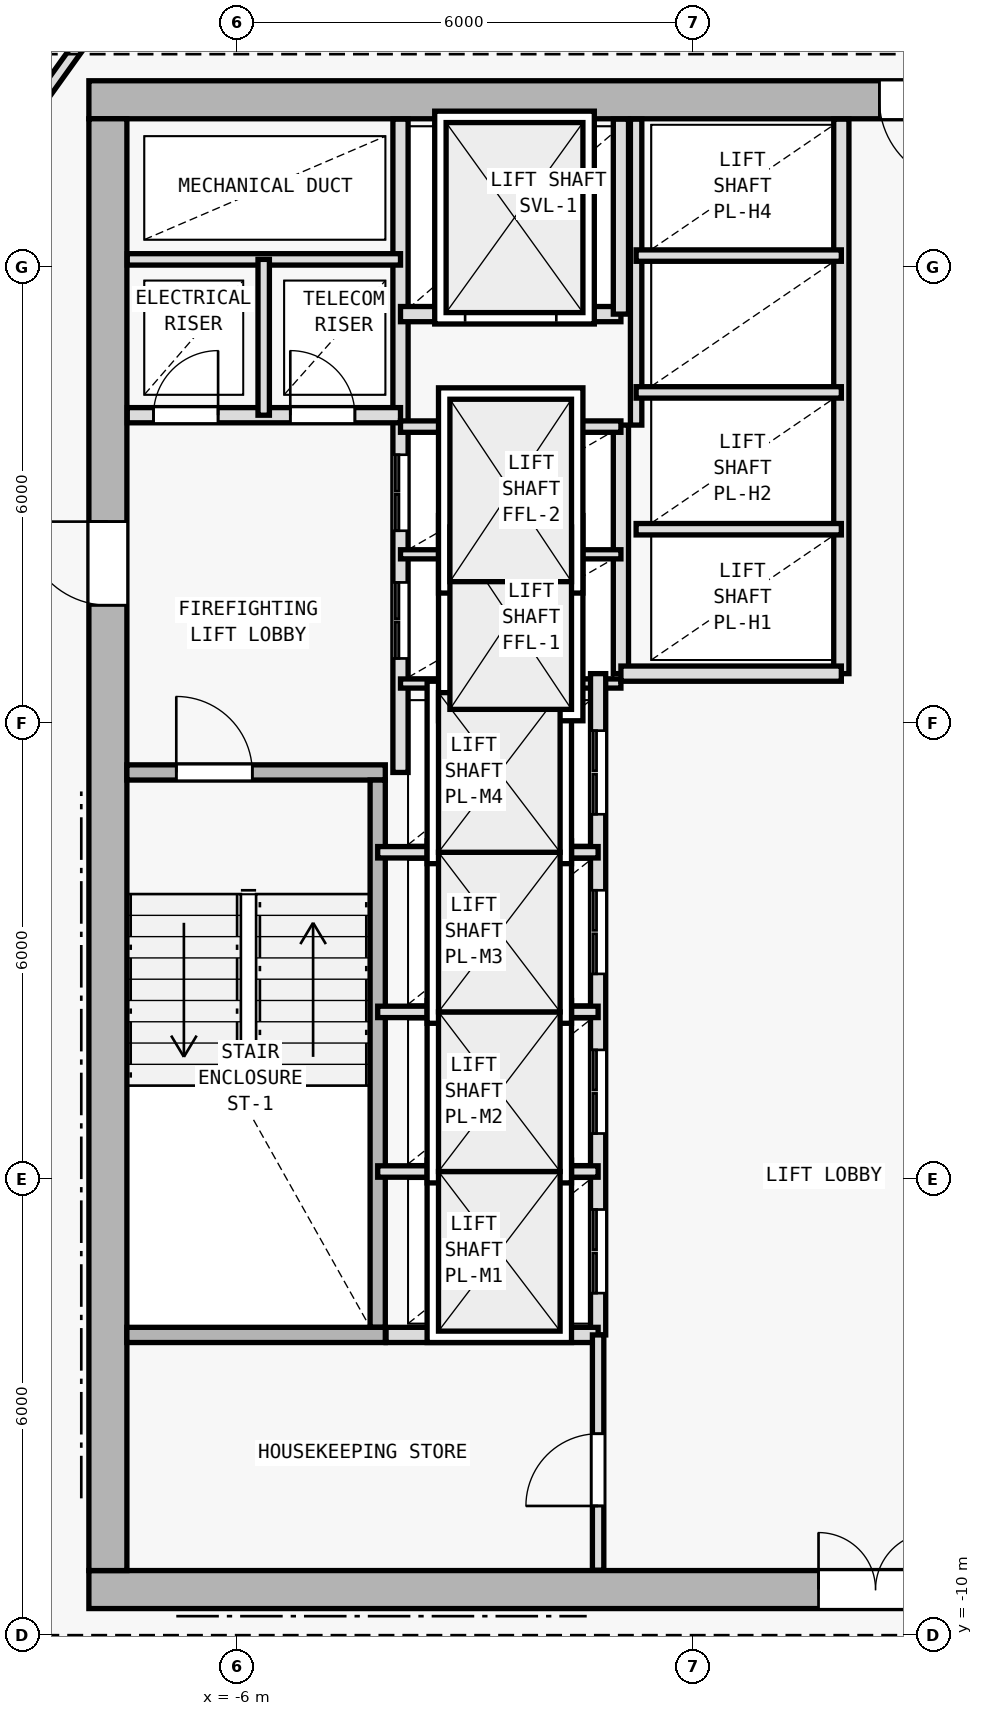
"""IFC4 building model, lengths in metres.
Left out: names, types, materials, properties, quantities, classifications, styles, units other than length and angle.
Written with IfcOpenShell. Run it as: python <this file> out.ifc"""

import sys

from ifc_helpers import new_model, si_unit, direction, frame, frame_2d, origin, origin_2d, place, context, subcontext, project, spatial, rectangle, i_section, extrude, element, fill, save


model = new_model("IFC4")
c1 = context("Model", 3, precision=1e-05, world=origin(), true_north=direction((0.0, 1.0)))
c2 = subcontext(c1, "Body", "Model", "MODEL_VIEW")
j1 = project(units=[si_unit("LENGTHUNIT", "METRE"), si_unit("PLANEANGLEUNIT", "RADIAN")], contexts=[c1])
p1 = place(None, origin())
s1 = spatial("IfcSite", under=j1, at=p1, CompositionType="ELEMENT")
p2 = place(p1, origin())
s2 = spatial("IfcBuilding", under=s1, at=p2, CompositionType="ELEMENT")
p3 = place(p2, frame((0.0, 0.0, 174.6)))
s3 = spatial("IfcBuildingStorey", under=s2, at=p3, CompositionType="ELEMENT", Elevation=174.6)
for number, where, z_axis, x_axis in (
    (1, (-7.7, -9.4, 0.0), (0.0, 0.0, 1.0), (1.0, 0.0, 0.0)),
    (2, (-7.7, 10.2, 0.0), (0.0, 0.0, 1.0), (1.0, 0.0, 0.0)),
    (3, (0.0, -9.4, 0.0), (0.0, 0.0, 1.0), (1.0, 0.0, 0.0)),
    (4, (-7.7, 2.0, 0.0), (0.0, 0.0, 1.0), (1.0, 0.0, 0.0)),
):
    element("IfcColumn", number, at=place(p3, frame(where, z_axis=z_axis, x_axis=x_axis)), inside=s3, PredefinedType="COLUMN", context=c2, shape_type="SweptSolid", body=[
        extrude(i_section(OverallWidth=0.404, OverallDepth=0.407, WebThickness=0.017, FlangeThickness=0.028, FilletRadius=0.015, at=origin_2d()), origin(), (0.0, 0.0, 1.0), 3.6),
    ])
p4 = place(p3, frame((-7.95, -9.4, 0.0), z_axis=(0.0, 0.0, 1.0), x_axis=(1.0, 0.0, 0.0)))
e5 = element("IfcWall", 5, at=p4, inside=s3, PredefinedType="SHEAR", context=c2, shape_type="SweptSolid", body=[
    extrude(rectangle(XDim=15.9, YDim=0.5, at=frame_2d((7.95, 0.0))), origin(), (0.0, 0.0, 1.0), 3.35),
])
p5 = place(p4, frame((9.6, 0.0, 0.0)))
e6 = element("IfcOpeningElement", 6, at=p5, cuts=e5, PredefinedType="OPENING", context=c2, shape_type="SweptSolid", body=[
    extrude(rectangle(XDim=1.5, YDim=2.2, at=frame_2d((0.75, 1.1))), frame((0.0, 0.26, 0.0), z_axis=(0.0, -1.0, 0.0), x_axis=(1.0, 0.0, 0.0)), (0.0, 0.0, 1.0), 0.52),
])
p6 = place(p3, frame((7.95, 10.2, 0.0), z_axis=(0.0, 0.0, 1.0), x_axis=(-1.0, 0.0, 0.0)))
e7 = element("IfcWall", 7, at=p6, inside=s3, PredefinedType="SHEAR", context=c2, shape_type="SweptSolid", body=[
    extrude(rectangle(XDim=15.9, YDim=0.5, at=frame_2d((7.95, 0.0))), origin(), (0.0, 0.0, 1.0), 3.35),
])
p7 = place(p6, frame((4.4, 0.0, 0.0)))
e8 = element("IfcOpeningElement", 8, at=p7, cuts=e7, PredefinedType="OPENING", context=c2, shape_type="SweptSolid", body=[
    extrude(rectangle(XDim=1.1, YDim=2.15, at=frame_2d((0.55, 1.075))), frame((0.0, 0.26, 0.0), z_axis=(0.0, -1.0, 0.0), x_axis=(1.0, 0.0, 0.0)), (0.0, 0.0, 1.0), 0.52),
])
p8 = place(p3, frame((-7.7, -9.15, 0.0), z_axis=(0.0, 0.0, 1.0), x_axis=(0.0, 1.0, 0.0)))
e9 = element("IfcWall", 9, at=p8, inside=s3, PredefinedType="SHEAR", context=c2, shape_type="SweptSolid", body=[
    extrude(rectangle(XDim=19.1, YDim=0.5, at=frame_2d((9.55, 0.0))), origin(), (0.0, 0.0, 1.0), 3.35),
])
p9 = place(p8, frame((12.7, 0.0, 0.0)))
e10 = element("IfcOpeningElement", 10, at=p9, cuts=e9, PredefinedType="OPENING", context=c2, shape_type="SweptSolid", body=[
    extrude(rectangle(XDim=1.1, YDim=2.15, at=frame_2d((0.55, 1.075))), frame((0.0, 0.26, 0.0), z_axis=(0.0, -1.0, 0.0), x_axis=(1.0, 0.0, 0.0)), (0.0, 0.0, 1.0), 0.52),
])
p10 = place(p3, frame((-7.45, 1.35, 0.0), z_axis=(0.0, 0.0, 1.0), x_axis=(1.0, 0.0, 0.0)))
e11 = element("IfcWall", 11, at=p10, inside=s3, PredefinedType="SOLIDWALL", context=c2, shape_type="SweptSolid", body=[
    extrude(rectangle(XDim=3.4, YDim=0.2, at=frame_2d((1.7, 0.0))), origin(), (0.0, 0.0, 1.0), 3.35),
])
p11 = place(p10, frame((0.65, 0.0, 0.0)))
e12 = element("IfcOpeningElement", 12, at=p11, cuts=e11, PredefinedType="OPENING", context=c2, shape_type="SweptSolid", body=[
    extrude(rectangle(XDim=1.0, YDim=2.15, at=frame_2d((0.5, 1.075))), frame((0.0, 0.11, 0.0), z_axis=(0.0, -1.0, 0.0), x_axis=(1.0, 0.0, 0.0)), (0.0, 0.0, 1.0), 0.22),
])
p12 = place(p3, frame((-4.15, -5.95, 0.0), z_axis=(0.0, 0.0, 1.0), x_axis=(0.0, 1.0, 0.0)))
e13 = element("IfcWall", 13, at=p12, inside=s3, PredefinedType="SOLIDWALL", context=c2, shape_type="SweptSolid", body=[
    extrude(rectangle(XDim=7.2, YDim=0.2, at=frame_2d((3.6, 0.0))), origin(), (0.0, 0.0, 1.0), 3.35),
])
p13 = place(p3, frame((-3.85, 1.35, 0.0), z_axis=(0.0, 0.0, 1.0), x_axis=(0.0, 1.0, 0.0)))
e14 = element("IfcWall", 14, at=p13, inside=s3, PredefinedType="SOLIDWALL", context=c2, shape_type="SweptSolid", body=[
    extrude(rectangle(XDim=8.595, YDim=0.2, at=frame_2d((4.297, 0.0))), origin(), (0.0, 0.0, 1.0), 3.35),
])
p14 = place(p13, frame((1.5, 0.0, 0.0)))
e15 = element("IfcOpeningElement", 15, at=p14, cuts=e14, PredefinedType="OPENING", context=c2, shape_type="SweptSolid", body=[
    extrude(rectangle(XDim=1.0, YDim=2.15, at=frame_2d((0.5, 1.075))), frame((0.0, 0.11, 0.0), z_axis=(0.0, -1.0, 0.0), x_axis=(1.0, 0.0, 0.0)), (0.0, 0.0, 1.0), 0.22),
])
p15 = place(p13, frame((3.18, 0.0, 0.0)))
e16 = element("IfcOpeningElement", 16, at=p15, cuts=e14, PredefinedType="OPENING", context=c2, shape_type="SweptSolid", body=[
    extrude(rectangle(XDim=1.0, YDim=2.15, at=frame_2d((0.5, 1.075))), frame((0.0, 0.11, 0.0), z_axis=(0.0, -1.0, 0.0), x_axis=(1.0, 0.0, 0.0)), (0.0, 0.0, 1.0), 0.22),
])
p16 = place(p3, frame((-7.445, 6.05, 0.0), z_axis=(0.0, 0.0, 1.0), x_axis=(1.0, 0.0, 0.0)))
e17 = element("IfcWall", 17, at=p16, inside=s3, PredefinedType="SOLIDWALL", context=c2, shape_type="SweptSolid", body=[
    extrude(rectangle(XDim=3.595, YDim=0.2, at=frame_2d((1.797, 0.0))), origin(), (0.0, 0.0, 1.0), 3.35),
])
p17 = place(p16, frame((0.345, 0.0, 0.0)))
e18 = element("IfcOpeningElement", 18, at=p17, cuts=e17, PredefinedType="OPENING", context=c2, shape_type="SweptSolid", body=[
    extrude(rectangle(XDim=0.85, YDim=2.1, at=frame_2d((0.425, 1.05))), frame((0.0, 0.11, 0.0), z_axis=(0.0, -1.0, 0.0), x_axis=(1.0, 0.0, 0.0)), (0.0, 0.0, 1.0), 0.22),
])
p18 = place(p16, frame((2.145, 0.0, 0.0)))
e19 = element("IfcOpeningElement", 19, at=p18, cuts=e17, PredefinedType="OPENING", context=c2, shape_type="SweptSolid", body=[
    extrude(rectangle(XDim=0.85, YDim=2.1, at=frame_2d((0.425, 1.05))), frame((0.0, 0.11, 0.0), z_axis=(0.0, -1.0, 0.0), x_axis=(1.0, 0.0, 0.0)), (0.0, 0.0, 1.0), 0.22),
])
p19 = place(p3, frame((-7.445, 8.1, 0.0), z_axis=(0.0, 0.0, 1.0), x_axis=(1.0, 0.0, 0.0)))
e20 = element("IfcWall", 20, at=p19, inside=s3, PredefinedType="PARTITIONING", context=c2, shape_type="SweptSolid", body=[
    extrude(rectangle(XDim=3.595, YDim=0.15, at=frame_2d((1.797, 0.0))), origin(), (0.0, 0.0, 1.0), 3.35),
])
p20 = place(p3, frame((-5.65, 6.05, 0.0), z_axis=(0.0, 0.0, 1.0), x_axis=(0.0, 1.0, 0.0)))
e21 = element("IfcWall", 21, at=p20, inside=s3, PredefinedType="PARTITIONING", context=c2, shape_type="SweptSolid", body=[
    extrude(rectangle(XDim=2.05, YDim=0.15, at=frame_2d((1.025, 0.0))), origin(), (0.0, 0.0, 1.0), 3.35),
])
p21 = place(p3, frame((-0.95, 2.65, 0.0), z_axis=(0.0, 0.0, 1.0), x_axis=(0.0, 1.0, 0.0)))
e22 = element("IfcWall", 22, at=p21, inside=s3, PredefinedType="SOLIDWALL", context=c2, shape_type="SweptSolid", body=[
    extrude(rectangle(XDim=3.27, YDim=0.2, at=frame_2d((1.635, 0.0))), origin(), (0.0, 0.0, 1.0), 3.35),
])
for number, where, z_axis, x_axis in (
    (23, (-3.85, 2.52, 0.0), (0.0, 0.0, 1.0), (1.0, 0.0, 0.0)),
    (24, (-3.85, 4.22, 0.0), (0.0, 0.0, 1.0), (1.0, 0.0, 0.0)),
):
    element("IfcWall", number, at=place(p3, frame(where, z_axis=z_axis, x_axis=x_axis)), inside=s3, PredefinedType="PARTITIONING", context=c2, shape_type="SweptSolid", body=[
        extrude(rectangle(XDim=2.9, YDim=0.12, at=frame_2d((1.45, 0.0))), origin(), (0.0, 0.0, 1.0), 3.35),
    ])
p22 = place(p3, frame((-3.85, 5.9, 0.0), z_axis=(0.0, 0.0, 1.0), x_axis=(1.0, 0.0, 0.0)))
e25 = element("IfcWall", 25, at=p22, inside=s3, PredefinedType="PARTITIONING", context=c2, shape_type="SweptSolid", body=[
    extrude(rectangle(XDim=2.9, YDim=0.15, at=frame_2d((1.45, 0.0))), origin(), (0.0, 0.0, 1.0), 3.35),
])
p23 = place(p3, frame((-3.85, 7.38, 0.0), z_axis=(0.0, 0.0, 1.0), x_axis=(1.0, 0.0, 0.0)))
e26 = element("IfcWall", 26, at=p23, inside=s3, PredefinedType="SOLIDWALL", context=c2, shape_type="SweptSolid", body=[
    extrude(rectangle(XDim=2.9, YDim=0.2, at=frame_2d((1.45, 0.0))), origin(), (0.0, 0.0, 1.0), 3.35),
])
p24 = place(p23, frame((0.85, 0.0, 0.0)))
e27 = element("IfcOpeningElement", 27, at=p24, cuts=e26, PredefinedType="OPENING", context=c2, shape_type="SweptSolid", body=[
    extrude(rectangle(XDim=1.2, YDim=2.2, at=frame_2d((0.6, 1.1))), frame((0.0, 0.11, 0.0), z_axis=(0.0, -1.0, 0.0), x_axis=(1.0, 0.0, 0.0)), (0.0, 0.0, 1.0), 0.22),
])
p25 = place(p3, frame((-0.95, 7.38, 0.0), z_axis=(0.0, 0.0, 1.0), x_axis=(0.0, 1.0, 0.0)))
e28 = element("IfcWall", 28, at=p25, inside=s3, PredefinedType="SOLIDWALL", context=c2, shape_type="SweptSolid", body=[
    extrude(rectangle(XDim=2.565, YDim=0.2, at=frame_2d((1.283, 0.0))), origin(), (0.0, 0.0, 1.0), 3.35),
])
p26 = place(p3, frame((-1.25, -6.05, 0.0), z_axis=(0.0, 0.0, 1.0), x_axis=(0.0, 1.0, 0.0)))
e29 = element("IfcWall", 29, at=p26, inside=s3, PredefinedType="SOLIDWALL", context=c2, shape_type="SweptSolid", body=[
    extrude(rectangle(XDim=8.7, YDim=0.2, at=frame_2d((4.35, 0.0))), origin(), (0.0, 0.0, 1.0), 3.35),
])
p27 = place(p26, frame((0.55, 0.0, 0.0)))
e30 = element("IfcOpeningElement", 30, at=p27, cuts=e29, PredefinedType="OPENING", context=c2, shape_type="SweptSolid", body=[
    extrude(rectangle(XDim=1.1, YDim=2.15, at=frame_2d((0.55, 1.075))), frame((0.0, 0.11, 0.0), z_axis=(0.0, -1.0, 0.0), x_axis=(1.0, 0.0, 0.0)), (0.0, 0.0, 1.0), 0.22),
])
p28 = place(p26, frame((2.65, 0.0, 0.0)))
e31 = element("IfcOpeningElement", 31, at=p28, cuts=e29, PredefinedType="OPENING", context=c2, shape_type="SweptSolid", body=[
    extrude(rectangle(XDim=1.1, YDim=2.15, at=frame_2d((0.55, 1.075))), frame((0.0, 0.11, 0.0), z_axis=(0.0, -1.0, 0.0), x_axis=(1.0, 0.0, 0.0)), (0.0, 0.0, 1.0), 0.22),
])
p29 = place(p26, frame((4.75, 0.0, 0.0)))
e32 = element("IfcOpeningElement", 32, at=p29, cuts=e29, PredefinedType="OPENING", context=c2, shape_type="SweptSolid", body=[
    extrude(rectangle(XDim=1.1, YDim=2.15, at=frame_2d((0.55, 1.075))), frame((0.0, 0.11, 0.0), z_axis=(0.0, -1.0, 0.0), x_axis=(1.0, 0.0, 0.0)), (0.0, 0.0, 1.0), 0.22),
])
p30 = place(p26, frame((6.85, 0.0, 0.0)))
e33 = element("IfcOpeningElement", 33, at=p30, cuts=e29, PredefinedType="OPENING", context=c2, shape_type="SweptSolid", body=[
    extrude(rectangle(XDim=1.1, YDim=2.15, at=frame_2d((0.55, 1.075))), frame((0.0, 0.11, 0.0), z_axis=(0.0, -1.0, 0.0), x_axis=(1.0, 0.0, 0.0)), (0.0, 0.0, 1.0), 0.22),
])
for number, where, z_axis, x_axis in (
    (34, (-4.15, -3.9, 0.0), (0.0, 0.0, 1.0), (1.0, 0.0, 0.0)),
    (35, (-4.15, -1.8, 0.0), (0.0, 0.0, 1.0), (1.0, 0.0, 0.0)),
    (36, (-4.15, 0.3, 0.0), (0.0, 0.0, 1.0), (1.0, 0.0, 0.0)),
):
    element("IfcWall", number, at=place(p3, frame(where, z_axis=z_axis, x_axis=x_axis)), inside=s3, PredefinedType="PARTITIONING", context=c2, shape_type="SweptSolid", body=[
        extrude(rectangle(XDim=2.9, YDim=0.15, at=frame_2d((1.45, 0.0))), origin(), (0.0, 0.0, 1.0), 3.35),
    ])
p31 = place(p3, frame((1.95, 2.65, 0.0), z_axis=(0.0, 0.0, 1.0), x_axis=(0.0, 1.0, 0.0)))
e37 = element("IfcWall", 37, at=p31, inside=s3, PredefinedType="SOLIDWALL", context=c2, shape_type="SweptSolid", body=[
    extrude(rectangle(XDim=7.295, YDim=0.2, at=frame_2d((3.647, 0.0))), origin(), (0.0, 0.0, 1.0), 3.35),
])
p32 = place(p3, frame((-0.95, 2.65, 0.0), z_axis=(0.0, 0.0, 1.0), x_axis=(1.0, 0.0, 0.0)))
e38 = element("IfcWall", 38, at=p32, inside=s3, PredefinedType="SOLIDWALL", context=c2, shape_type="SweptSolid", body=[
    extrude(rectangle(XDim=2.9, YDim=0.2, at=frame_2d((1.45, 0.0))), origin(), (0.0, 0.0, 1.0), 3.35),
])
p33 = place(p3, frame((-0.75, 5.92, 0.0), z_axis=(0.0, 0.0, 1.0), x_axis=(0.0, 1.0, 0.0)))
e39 = element("IfcWall", 39, at=p33, inside=s3, PredefinedType="PARTITIONING", context=c2, shape_type="SweptSolid", body=[
    extrude(rectangle(XDim=4.025, YDim=0.15, at=frame_2d((2.013, 0.0))), origin(), (0.0, 0.0, 1.0), 3.35),
])
for number, where, z_axis, x_axis in (
    (40, (-0.75, 4.55, 0.0), (0.0, 0.0, 1.0), (1.0, 0.0, 0.0)),
    (41, (-0.75, 6.35, 0.0), (0.0, 0.0, 1.0), (1.0, 0.0, 0.0)),
    (42, (-0.75, 8.15, 0.0), (0.0, 0.0, 1.0), (1.0, 0.0, 0.0)),
):
    element("IfcWall", number, at=place(p3, frame(where, z_axis=z_axis, x_axis=x_axis)), inside=s3, PredefinedType="PARTITIONING", context=c2, shape_type="SweptSolid", body=[
        extrude(rectangle(XDim=2.7, YDim=0.15, at=frame_2d((1.35, 0.0))), origin(), (0.0, 0.0, 1.0), 3.35),
    ])
p34 = place(p3, frame((-7.45, -6.05, 0.0), z_axis=(0.0, 0.0, 1.0), x_axis=(1.0, 0.0, 0.0)))
e43 = element("IfcWall", 43, at=p34, inside=s3, PredefinedType="SOLIDWALL", context=c2, shape_type="SweptSolid", body=[
    extrude(rectangle(XDim=3.4, YDim=0.2, at=frame_2d((1.7, 0.0))), origin(), (0.0, 0.0, 1.0), 3.35),
])
p35 = place(p3, frame((-4.04, -6.05, 0.0), z_axis=(0.0, 0.0, 1.0), x_axis=(1.0, 0.0, 0.0)))
e44 = element("IfcWall", 44, at=p35, inside=s3, PredefinedType="SOLIDWALL", context=c2, shape_type="SweptSolid", body=[
    extrude(rectangle(XDim=2.79, YDim=0.2, at=frame_2d((1.395, 0.0))), origin(), (0.0, 0.0, 1.0), 3.35),
])
p36 = place(p3, frame((-1.25, -9.145, 0.0), z_axis=(0.0, 0.0, 1.0), x_axis=(0.0, 1.0, 0.0)))
e45 = element("IfcWall", 45, at=p36, inside=s3, PredefinedType="PARTITIONING", context=c2, shape_type="SweptSolid", body=[
    extrude(rectangle(XDim=3.095, YDim=0.15, at=frame_2d((1.547, 0.0))), origin(), (0.0, 0.0, 1.0), 3.35),
])
p37 = place(p36, frame((0.845, 0.0, 0.0)))
e46 = element("IfcOpeningElement", 46, at=p37, cuts=e45, PredefinedType="OPENING", context=c2, shape_type="SweptSolid", body=[
    extrude(rectangle(XDim=0.95, YDim=2.1, at=frame_2d((0.475, 1.05))), frame((0.0, 0.085, 0.0), z_axis=(0.0, -1.0, 0.0), x_axis=(1.0, 0.0, 0.0)), (0.0, 0.0, 1.0), 0.17),
])
p38 = place(p3, frame((-9.86, 8.426, 0.0), z_axis=(0.0, 0.0, 1.0), x_axis=(0.582449511476, 0.812866881218, 0.0)))
e47 = element("IfcWall", 47, at=p38, inside=s3, PredefinedType="PARTITIONING", context=c2, shape_type="SweptSolid", body=[
    extrude(rectangle(XDim=4.84, YDim=0.15, at=frame_2d((2.42, 0.0))), origin(), (0.0, 0.0, 1.0), 3.005),
])
p39 = place(p5, origin())
e48 = element("IfcDoor", 48, at=p39, inside=s3, OperationType="DOUBLE_DOOR_SINGLE_SWING", PredefinedType="DOOR", context=c2, shape_type="SweptSolid", body=[
    extrude(rectangle(XDim=1.5, YDim=2.2, at=frame_2d((0.75, 1.1))), frame((0.0, 0.025, 0.0), z_axis=(0.0, -1.0, 0.0), x_axis=(1.0, 0.0, 0.0)), (0.0, 0.0, 1.0), 0.05),
])
fill(e6, e48)
p40 = place(p9, origin())
e49 = element("IfcDoor", 49, at=p40, inside=s3, OperationType="SINGLE_SWING_RIGHT", PredefinedType="DOOR", context=c2, shape_type="SweptSolid", body=[
    extrude(rectangle(XDim=1.1, YDim=2.15, at=frame_2d((0.55, 1.075))), frame((0.0, 0.025, 0.0), z_axis=(0.0, -1.0, 0.0), x_axis=(1.0, 0.0, 0.0)), (0.0, 0.0, 1.0), 0.05),
])
fill(e10, e49)
p41 = place(p7, origin())
e50 = element("IfcDoor", 50, at=p41, inside=s3, OperationType="SINGLE_SWING_LEFT", PredefinedType="DOOR", context=c2, shape_type="SweptSolid", body=[
    extrude(rectangle(XDim=1.1, YDim=2.15, at=frame_2d((0.55, 1.075))), frame((0.0, 0.025, 0.0), z_axis=(0.0, -1.0, 0.0), x_axis=(1.0, 0.0, 0.0)), (0.0, 0.0, 1.0), 0.05),
])
fill(e8, e50)
p42 = place(p11, origin())
e51 = element("IfcDoor", 51, at=p42, inside=s3, OperationType="SINGLE_SWING_LEFT", PredefinedType="DOOR", context=c2, shape_type="SweptSolid", body=[
    extrude(rectangle(XDim=1.0, YDim=2.15, at=frame_2d((0.5, 1.075))), frame((0.0, 0.025, 0.0), z_axis=(0.0, -1.0, 0.0), x_axis=(1.0, 0.0, 0.0)), (0.0, 0.0, 1.0), 0.05),
])
fill(e12, e51)
p43 = place(p17, origin())
e52 = element("IfcDoor", 52, at=p43, inside=s3, OperationType="SINGLE_SWING_RIGHT", PredefinedType="DOOR", context=c2, shape_type="SweptSolid", body=[
    extrude(rectangle(XDim=0.85, YDim=2.1, at=frame_2d((0.425, 1.05))), frame((0.0, 0.025, 0.0), z_axis=(0.0, -1.0, 0.0), x_axis=(1.0, 0.0, 0.0)), (0.0, 0.0, 1.0), 0.05),
])
fill(e18, e52)
p44 = place(p18, origin())
e53 = element("IfcDoor", 53, at=p44, inside=s3, OperationType="SINGLE_SWING_LEFT", PredefinedType="DOOR", context=c2, shape_type="SweptSolid", body=[
    extrude(rectangle(XDim=0.85, YDim=2.1, at=frame_2d((0.425, 1.05))), frame((0.0, 0.025, 0.0), z_axis=(0.0, -1.0, 0.0), x_axis=(1.0, 0.0, 0.0)), (0.0, 0.0, 1.0), 0.05),
])
fill(e19, e53)
p45 = place(p24, origin())
e54 = element("IfcDoor", 54, at=p45, inside=s3, OperationType="DOUBLE_DOOR_SLIDING", PredefinedType="DOOR", context=c2, shape_type="SweptSolid", body=[
    extrude(rectangle(XDim=1.2, YDim=2.2, at=frame_2d((0.6, 1.1))), frame((0.0, 0.025, 0.0), z_axis=(0.0, -1.0, 0.0), x_axis=(1.0, 0.0, 0.0)), (0.0, 0.0, 1.0), 0.05),
])
fill(e27, e54)
p46 = place(p27, origin())
e55 = element("IfcDoor", 55, at=p46, inside=s3, OperationType="DOUBLE_DOOR_SLIDING", PredefinedType="DOOR", context=c2, shape_type="SweptSolid", body=[
    extrude(rectangle(XDim=1.1, YDim=2.15, at=frame_2d((0.55, 1.075))), frame((0.0, 0.025, 0.0), z_axis=(0.0, -1.0, 0.0), x_axis=(1.0, 0.0, 0.0)), (0.0, 0.0, 1.0), 0.05),
])
fill(e30, e55)
p47 = place(p28, origin())
e56 = element("IfcDoor", 56, at=p47, inside=s3, OperationType="DOUBLE_DOOR_SLIDING", PredefinedType="DOOR", context=c2, shape_type="SweptSolid", body=[
    extrude(rectangle(XDim=1.1, YDim=2.15, at=frame_2d((0.55, 1.075))), frame((0.0, 0.025, 0.0), z_axis=(0.0, -1.0, 0.0), x_axis=(1.0, 0.0, 0.0)), (0.0, 0.0, 1.0), 0.05),
])
fill(e31, e56)
p48 = place(p29, origin())
e57 = element("IfcDoor", 57, at=p48, inside=s3, OperationType="DOUBLE_DOOR_SLIDING", PredefinedType="DOOR", context=c2, shape_type="SweptSolid", body=[
    extrude(rectangle(XDim=1.1, YDim=2.15, at=frame_2d((0.55, 1.075))), frame((0.0, 0.025, 0.0), z_axis=(0.0, -1.0, 0.0), x_axis=(1.0, 0.0, 0.0)), (0.0, 0.0, 1.0), 0.05),
])
fill(e32, e57)
p49 = place(p30, origin())
e58 = element("IfcDoor", 58, at=p49, inside=s3, OperationType="DOUBLE_DOOR_SLIDING", PredefinedType="DOOR", context=c2, shape_type="SweptSolid", body=[
    extrude(rectangle(XDim=1.1, YDim=2.15, at=frame_2d((0.55, 1.075))), frame((0.0, 0.025, 0.0), z_axis=(0.0, -1.0, 0.0), x_axis=(1.0, 0.0, 0.0)), (0.0, 0.0, 1.0), 0.05),
])
fill(e33, e58)
p50 = place(p14, origin())
e59 = element("IfcDoor", 59, at=p50, inside=s3, OperationType="DOUBLE_DOOR_SLIDING", PredefinedType="DOOR", context=c2, shape_type="SweptSolid", body=[
    extrude(rectangle(XDim=1.0, YDim=2.15, at=frame_2d((0.5, 1.075))), frame((0.0, 0.025, 0.0), z_axis=(0.0, -1.0, 0.0), x_axis=(1.0, 0.0, 0.0)), (0.0, 0.0, 1.0), 0.05),
])
fill(e15, e59)
p51 = place(p15, origin())
e60 = element("IfcDoor", 60, at=p51, inside=s3, OperationType="DOUBLE_DOOR_SLIDING", PredefinedType="DOOR", context=c2, shape_type="SweptSolid", body=[
    extrude(rectangle(XDim=1.0, YDim=2.15, at=frame_2d((0.5, 1.075))), frame((0.0, 0.025, 0.0), z_axis=(0.0, -1.0, 0.0), x_axis=(1.0, 0.0, 0.0)), (0.0, 0.0, 1.0), 0.05),
])
fill(e16, e60)
p52 = place(p37, origin())
e61 = element("IfcDoor", 61, at=p52, inside=s3, OperationType="SINGLE_SWING_LEFT", PredefinedType="DOOR", context=c2, shape_type="SweptSolid", body=[
    extrude(rectangle(XDim=0.95, YDim=2.1, at=frame_2d((0.475, 1.05))), frame((0.0, 0.025, 0.0), z_axis=(0.0, -1.0, 0.0), x_axis=(1.0, 0.0, 0.0)), (0.0, 0.0, 1.0), 0.05),
])
fill(e46, e61)
save(model, sys.argv[1])
